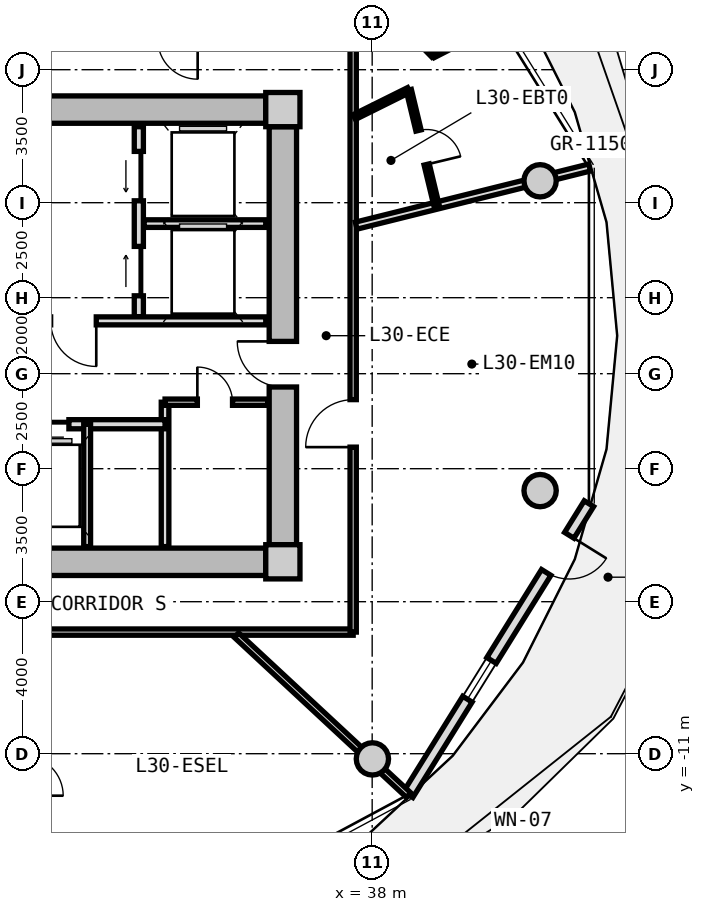
"""IFC4 building model, lengths in metres.
Left out: names, types, materials, properties, quantities, classifications, styles, units other than length and angle.
Written with IfcOpenShell. Run it as: python <this file> out.ifc"""

import sys

from ifc_helpers import new_model, si_unit, direction, frame, frame_2d, origin, origin_2d, place, context, subcontext, project, spatial, rectangle, circle, extrude, source, transform, mapped, element, fill, save


model = new_model("IFC4")
c1 = context("Model", 3, precision=1e-05, world=origin(), true_north=direction((0.0, 1.0)))
c2 = subcontext(c1, "Body", "Model", "MODEL_VIEW")
j1 = project(units=[si_unit("LENGTHUNIT", "METRE"), si_unit("PLANEANGLEUNIT", "RADIAN")], contexts=[c1])
p1 = place(None, origin())
s1 = spatial("IfcSite", under=j1, at=p1, CompositionType="ELEMENT")
p2 = place(p1, origin())
s2 = spatial("IfcBuilding", under=s1, at=p2, CompositionType="ELEMENT")
p3 = place(p2, frame((0.0, 0.0, 99.3)))
s3 = spatial("IfcBuildingStorey", under=s2, at=p3, CompositionType="ELEMENT", Elevation=99.3)
m1 = source(origin(), c2, "Body", "SweptSolid", [
    extrude(rectangle(XDim=0.9, YDim=0.9, at=origin_2d()), origin(), (0.0, 0.0, 1.0), 3.05),
])
for number, where, z_axis, x_axis in (
    (1, (35.65, -5.95, 0.0), (0.0, 0.0, 1.0), (1.0, 0.0, 0.0)),
    (2, (35.65, 5.95, 0.0), (0.0, 0.0, 1.0), (1.0, 0.0, 0.0)),
):
    element("IfcColumn", number, at=place(p3, frame(where, z_axis=z_axis, x_axis=x_axis)), inside=s3, PredefinedType="COLUMN", context=c2, shape_type="MappedRepresentation", body=[
        mapped(m1, transform((0.0, 0.0, 0.0), x_axis=(1.0, 0.0, 0.0), y_axis=(0.0, 1.0, 0.0), z_axis=(0.0, 0.0, 1.0), scale=1.0)),
    ])
m2 = source(origin(), c2, "Body", "SweptSolid", [
    extrude(rectangle(XDim=14.4, YDim=0.72, at=frame_2d((7.2, 0.0))), origin(), (0.0, 0.0, 1.0), 2.79),
])
for number, where, z_axis, x_axis in (
    (3, (20.8, 5.95, 0.0), (0.0, 0.0, 1.0), (1.0, 0.0, 0.0)),
    (4, (35.2, -5.95, 0.0), (0.0, 0.0, 1.0), (-1.0, 0.0, 0.0)),
):
    element("IfcWall", number, at=place(p3, frame(where, z_axis=z_axis, x_axis=x_axis)), inside=s3, PredefinedType="SHEAR", context=c2, shape_type="MappedRepresentation", body=[
        mapped(m2, transform((0.0, 0.0, 0.0), x_axis=(1.0, 0.0, 0.0), y_axis=(0.0, 1.0, 0.0), z_axis=(0.0, 0.0, 1.0), scale=1.0)),
    ])
m3 = source(origin(), c2, "Body", "SweptSolid", [
    extrude(rectangle(XDim=11.0, YDim=0.72, at=frame_2d((5.5, 0.0))), origin(), (0.0, 0.0, 1.0), 2.79),
])
p4 = place(p3, frame((35.65, 5.5, 0.0), z_axis=(0.0, 0.0, 1.0), x_axis=(0.0, -1.0, 0.0)))
e5 = element("IfcWall", 5, at=p4, inside=s3, PredefinedType="SHEAR", context=c2, shape_type="MappedRepresentation", body=[
    mapped(m3, transform((0.0, 0.0, 0.0), x_axis=(1.0, 0.0, 0.0), y_axis=(0.0, 1.0, 0.0), z_axis=(0.0, 0.0, 1.0), scale=1.0)),
])
p5 = place(p4, frame((5.65, 0.0, 0.0)))
e6 = element("IfcOpeningElement", 6, at=p5, cuts=e5, PredefinedType="OPENING", context=c2, shape_type="SweptSolid", body=[
    extrude(rectangle(XDim=1.2, YDim=2.15, at=frame_2d((0.6, 1.075))), frame((0.0, 0.37, 0.0), z_axis=(0.0, -1.0, 0.0), x_axis=(1.0, 0.0, 0.0)), (0.0, 0.0, 1.0), 0.74),
])
m4 = source(origin(), c2, "Body", "SweptSolid", [
    extrude(circle(Radius=0.425, at=origin_2d()), origin(), (0.0, 0.0, 1.0), 3.05),
])
for number, where, z_axis, x_axis in (
    (7, (42.419, 4.076, 0.0), (0.0, 0.0, 1.0), (1.0, 0.0, 0.0)),
    (8, (38.006, -11.137, 0.0), (0.0, 0.0, 1.0), (1.0, 0.0, 0.0)),
    (9, (42.419, -4.076, 0.0), (0.0, 0.0, 1.0), (1.0, 0.0, 0.0)),
):
    element("IfcColumn", number, at=place(p3, frame(where, z_axis=z_axis, x_axis=x_axis)), inside=s3, PredefinedType="COLUMN", context=c2, shape_type="MappedRepresentation", body=[
        mapped(m4, transform((0.0, 0.0, 0.0), x_axis=(1.0, 0.0, 0.0), y_axis=(0.0, 1.0, 0.0), z_axis=(0.0, 0.0, 1.0), scale=1.0)),
    ])
m5 = source(origin(), c2, "Body", "SweptSolid", [
    extrude(rectangle(XDim=9.014, YDim=0.29, at=frame_2d((4.507, 0.0))), origin(), (0.0, 0.0, 1.0), 2.79),
])
p6 = place(p3, frame((43.704, -4.421, 0.0), z_axis=(0.0, 0.0, 1.0), x_axis=(-0.527732945084, -0.849410347637, 0.0)))
e10 = element("IfcWall", 10, at=p6, inside=s3, PredefinedType="SOLIDWALL", context=c2, shape_type="MappedRepresentation", body=[
    mapped(m5, transform((0.0, 0.0, 0.0), x_axis=(1.0, 0.0, 0.0), y_axis=(0.0, 1.0, 0.0), z_axis=(0.0, 0.0, 1.0), scale=1.0)),
])
p7 = place(p6, frame((0.98, 0.0, 0.0)))
e11 = element("IfcOpeningElement", 11, at=p7, cuts=e10, PredefinedType="OPENING", context=c2, shape_type="SweptSolid", body=[
    extrude(rectangle(XDim=1.15, YDim=2.25, at=frame_2d((0.575, 1.125))), frame((0.0, 0.155, 0.0), z_axis=(0.0, -1.0, 0.0), x_axis=(1.0, 0.0, 0.0)), (0.0, 0.0, 1.0), 0.31),
])
p8 = place(p6, frame((4.857, 0.0, 0.85)))
e12 = element("IfcOpeningElement", 12, at=p8, cuts=e10, PredefinedType="OPENING", context=c2, shape_type="SweptSolid", body=[
    extrude(rectangle(XDim=1.2, YDim=1.5, at=frame_2d((0.6, 0.75))), frame((0.0, 0.155, 0.0), z_axis=(0.0, -1.0, 0.0), x_axis=(1.0, 0.0, 0.0)), (0.0, 0.0, 1.0), 0.31),
])
m6 = source(origin(), c2, "Body", "SweptSolid", [
    extrude(rectangle(XDim=5.0, YDim=0.24, at=frame_2d((2.5, 0.0))), origin(), (0.0, 0.0, 1.0), 2.775),
])
p9 = place(p3, frame((31.86, 0.5, 0.0), z_axis=(0.0, 0.0, 1.0), x_axis=(0.0, 1.0, 0.0)))
e13 = element("IfcWall", 13, at=p9, inside=s3, PredefinedType="PARTITIONING", context=c2, shape_type="MappedRepresentation", body=[
    mapped(m6, transform((0.0, 0.0, 0.0), x_axis=(1.0, 0.0, 0.0), y_axis=(0.0, 1.0, 0.0), z_axis=(0.0, 0.0, 1.0), scale=1.0)),
])
p10 = place(p9, frame((3.05, 0.0, 0.0)))
e14 = element("IfcOpeningElement", 14, at=p10, cuts=e13, PredefinedType="OPENING", context=c2, shape_type="SweptSolid", body=[
    extrude(rectangle(XDim=1.3, YDim=2.2, at=frame_2d((0.65, 1.1))), frame((0.0, 0.13, 0.0), z_axis=(0.0, -1.0, 0.0), x_axis=(1.0, 0.0, 0.0)), (0.0, 0.0, 1.0), 0.26),
])
p11 = place(p9, frame((0.55, 0.0, 0.0)))
e15 = element("IfcOpeningElement", 15, at=p11, cuts=e13, PredefinedType="OPENING", context=c2, shape_type="SweptSolid", body=[
    extrude(rectangle(XDim=1.3, YDim=2.2, at=frame_2d((0.65, 1.1))), frame((0.0, 0.13, 0.0), z_axis=(0.0, -1.0, 0.0), x_axis=(1.0, 0.0, 0.0)), (0.0, 0.0, 1.0), 0.26),
])
m7 = source(origin(), c2, "Body", "SweptSolid", [
    extrude(rectangle(XDim=3.2, YDim=0.2, at=frame_2d((1.6, 0.0))), origin(), (0.0, 0.0, 1.0), 2.775),
])
p12 = place(p3, frame((32.0, 2.95, 0.0), z_axis=(0.0, 0.0, 1.0), x_axis=(1.0, 0.0, 0.0)))
e16 = element("IfcWall", 16, at=p12, inside=s3, PredefinedType="PARTITIONING", context=c2, shape_type="MappedRepresentation", body=[
    mapped(m7, transform((0.0, 0.0, 0.0), x_axis=(1.0, 0.0, 0.0), y_axis=(0.0, 1.0, 0.0), z_axis=(0.0, 0.0, 1.0), scale=1.0)),
])
m8 = source(origin(), c2, "Body", "SweptSolid", [
    extrude(rectangle(XDim=6.66, YDim=0.21, at=frame_2d((3.33, 0.0))), origin(), (0.0, 0.0, 1.0), 2.775),
])
p13 = place(p3, frame((28.54, 0.39, 0.0), z_axis=(0.0, 0.0, 1.0), x_axis=(1.0, 0.0, 0.0)))
e17 = element("IfcWall", 17, at=p13, inside=s3, PredefinedType="PARTITIONING", context=c2, shape_type="MappedRepresentation", body=[
    mapped(m8, transform((0.0, 0.0, 0.0), x_axis=(1.0, 0.0, 0.0), y_axis=(0.0, 1.0, 0.0), z_axis=(0.0, 0.0, 1.0), scale=1.0)),
])
p14 = place(p13, frame((1.0, 0.0, 0.0)))
e18 = element("IfcOpeningElement", 18, at=p14, cuts=e17, PredefinedType="OPENING", context=c2, shape_type="SweptSolid", body=[
    extrude(rectangle(XDim=1.2, YDim=2.15, at=frame_2d((0.6, 1.075))), frame((0.0, 0.115, 0.0), z_axis=(0.0, -1.0, 0.0), x_axis=(1.0, 0.0, 0.0)), (0.0, 0.0, 1.0), 0.23),
])
m9 = source(origin(), c2, "Body", "SweptSolid", [
    extrude(rectangle(XDim=3.8, YDim=0.2, at=frame_2d((1.9, 0.0))), origin(), (0.0, 0.0, 1.0), 2.775),
])
p15 = place(p3, frame((32.55, -5.55, 0.0), z_axis=(0.0, 0.0, 1.0), x_axis=(0.0, 1.0, 0.0)))
e19 = element("IfcWall", 19, at=p15, inside=s3, PredefinedType="PARTITIONING", context=c2, shape_type="MappedRepresentation", body=[
    mapped(m9, transform((0.0, 0.0, 0.0), x_axis=(1.0, 0.0, 0.0), y_axis=(0.0, 1.0, 0.0), z_axis=(0.0, 0.0, 1.0), scale=1.0)),
])
m10 = source(origin(), c2, "Body", "SweptSolid", [
    extrude(rectangle(XDim=4.13, YDim=0.24, at=frame_2d((2.065, 0.0))), origin(), (0.0, 0.0, 1.0), 2.775),
])
p16 = place(p3, frame((28.42, -2.33, 0.0), z_axis=(0.0, 0.0, 1.0), x_axis=(1.0, 0.0, 0.0)))
e20 = element("IfcWall", 20, at=p16, inside=s3, PredefinedType="PARTITIONING", context=c2, shape_type="MappedRepresentation", body=[
    mapped(m10, transform((0.0, 0.0, 0.0), x_axis=(1.0, 0.0, 0.0), y_axis=(0.0, 1.0, 0.0), z_axis=(0.0, 0.0, 1.0), scale=1.0)),
])
p17 = place(p16, frame((0.5, 0.0, 0.0)))
e21 = element("IfcOpeningElement", 21, at=p17, cuts=e20, PredefinedType="OPENING", context=c2, shape_type="SweptSolid", body=[
    extrude(rectangle(XDim=1.1, YDim=2.2, at=frame_2d((0.55, 1.1))), frame((0.0, 0.13, 0.0), z_axis=(0.0, -1.0, 0.0), x_axis=(1.0, 0.0, 0.0)), (0.0, 0.0, 1.0), 0.26),
])
m11 = source(origin(), c2, "Body", "SweptSolid", [
    extrude(rectangle(XDim=3.22, YDim=0.18, at=frame_2d((1.61, 0.0))), origin(), (0.0, 0.0, 1.0), 2.775),
])
p18 = place(p3, frame((30.5, -5.55, 0.0), z_axis=(0.0, 0.0, 1.0), x_axis=(0.0, 1.0, 0.0)))
e22 = element("IfcWall", 22, at=p18, inside=s3, PredefinedType="PARTITIONING", context=c2, shape_type="MappedRepresentation", body=[
    mapped(m11, transform((0.0, 0.0, 0.0), x_axis=(1.0, 0.0, 0.0), y_axis=(0.0, 1.0, 0.0), z_axis=(0.0, 0.0, 1.0), scale=1.0)),
])
m12 = source(origin(), c2, "Body", "SweptSolid", [
    extrude(rectangle(XDim=2.7, YDim=0.165, at=frame_2d((1.35, 0.0))), origin(), (0.0, 0.0, 1.0), 2.775),
])
p19 = place(p3, frame((32.55, -1.75, 0.0), z_axis=(0.0, 0.0, 1.0), x_axis=(1.0, 0.0, 0.0)))
e23 = element("IfcWall", 23, at=p19, inside=s3, PredefinedType="PARTITIONING", context=c2, shape_type="MappedRepresentation", body=[
    mapped(m12, transform((0.0, 0.0, 0.0), x_axis=(1.0, 0.0, 0.0), y_axis=(0.0, 1.0, 0.0), z_axis=(0.0, 0.0, 1.0), scale=1.0)),
])
p20 = place(p19, frame((0.85, 0.0, 0.0)))
e24 = element("IfcOpeningElement", 24, at=p20, cuts=e23, PredefinedType="OPENING", context=c2, shape_type="SweptSolid", body=[
    extrude(rectangle(XDim=0.925, YDim=2.1, at=frame_2d((0.462, 1.05))), frame((0.0, 0.093, 0.0), z_axis=(0.0, -1.0, 0.0), x_axis=(1.0, 0.0, 0.0)), (0.0, 0.0, 1.0), 0.185),
])
m13 = source(origin(), c2, "Body", "SweptSolid", [
    extrude(rectangle(XDim=8.6, YDim=0.165, at=frame_2d((4.3, 0.0))), origin(), (0.0, 0.0, 1.0), 2.775),
])
p21 = place(p3, frame((37.5, -7.8, 0.0), z_axis=(0.0, 0.0, 1.0), x_axis=(-1.0, 0.0, 0.0)))
e25 = element("IfcWall", 25, at=p21, inside=s3, PredefinedType="PARTITIONING", context=c2, shape_type="MappedRepresentation", body=[
    mapped(m13, transform((0.0, 0.0, 0.0), x_axis=(1.0, 0.0, 0.0), y_axis=(0.0, 1.0, 0.0), z_axis=(0.0, 0.0, 1.0), scale=1.0)),
])
m14 = source(origin(), c2, "Body", "SweptSolid", [
    extrude(rectangle(XDim=15.6, YDim=0.165, at=frame_2d((7.8, 0.0))), origin(), (0.0, 0.0, 1.0), 2.775),
])
p22 = place(p3, frame((37.5, 7.8, 0.0), z_axis=(0.0, 0.0, 1.0), x_axis=(0.0, -1.0, 0.0)))
e26 = element("IfcWall", 26, at=p22, inside=s3, PredefinedType="PARTITIONING", context=c2, shape_type="MappedRepresentation", body=[
    mapped(m14, transform((0.0, 0.0, 0.0), x_axis=(1.0, 0.0, 0.0), y_axis=(0.0, 1.0, 0.0), z_axis=(0.0, 0.0, 1.0), scale=1.0)),
])
p23 = place(p22, frame((9.482, 0.0, 0.0)))
e27 = element("IfcOpeningElement", 27, at=p23, cuts=e26, PredefinedType="OPENING", context=c2, shape_type="SweptSolid", body=[
    extrude(rectangle(XDim=1.25, YDim=2.2, at=frame_2d((0.625, 1.1))), frame((0.0, 0.093, 0.0), z_axis=(0.0, -1.0, 0.0), x_axis=(1.0, 0.0, 0.0)), (0.0, 0.0, 1.0), 0.185),
])
m15 = source(origin(), c2, "Body", "SweptSolid", [
    extrude(rectangle(XDim=6.187, YDim=0.165, at=frame_2d((3.093, 0.0))), origin(), (0.0, 0.0, 1.0), 2.275),
])
p24 = place(p3, frame((34.429, -7.88, 0.0), z_axis=(0.0, 0.0, 1.0), x_axis=(0.732501077882, -0.680765870841, 0.0)))
e28 = element("IfcWall", 28, at=p24, inside=s3, PredefinedType="PARTITIONING", context=c2, shape_type="MappedRepresentation", body=[
    mapped(m15, transform((0.0, 0.0, 0.0), x_axis=(1.0, 0.0, 0.0), y_axis=(0.0, 1.0, 0.0), z_axis=(0.0, 0.0, 1.0), scale=1.0)),
])
m16 = source(origin(), c2, "Body", "SweptSolid", [
    extrude(rectangle(XDim=6.331, YDim=0.19, at=frame_2d((3.165, 0.0))), origin(), (0.0, 0.0, 1.0), 2.275),
])
p25 = place(p3, frame((37.58, 2.896, 0.0), z_axis=(0.0, 0.0, 1.0), x_axis=(0.97036440661, 0.241646267062, 0.0)))
e29 = element("IfcWall", 29, at=p25, inside=s3, PredefinedType="PARTITIONING", context=c2, shape_type="MappedRepresentation", body=[
    mapped(m16, transform((0.0, 0.0, 0.0), x_axis=(1.0, 0.0, 0.0), y_axis=(0.0, 1.0, 0.0), z_axis=(0.0, 0.0, 1.0), scale=1.0)),
])
m17 = source(origin(), c2, "Body", "SweptSolid", [
    extrude(rectangle(XDim=1.6, YDim=0.14, at=frame_2d((0.8, 0.0))), origin(), (0.0, 0.0, 1.0), 2.775),
])
p26 = place(p3, frame((37.53, 5.754, 0.0), z_axis=(0.0, 0.0, 1.0), x_axis=(0.895522919837, 0.445015393044, 0.0)))
e30 = element("IfcWall", 30, at=p26, inside=s3, PredefinedType="PARTITIONING", context=c2, shape_type="MappedRepresentation", body=[
    mapped(m17, transform((0.0, 0.0, 0.0), x_axis=(1.0, 0.0, 0.0), y_axis=(0.0, 1.0, 0.0), z_axis=(0.0, 0.0, 1.0), scale=1.0)),
])
m18 = source(origin(), c2, "Body", "SweptSolid", [
    extrude(rectangle(XDim=3.112, YDim=0.14, at=frame_2d((1.556, 0.0))), origin(), (0.0, 0.0, 1.0), 2.415),
])
p27 = place(p3, frame((38.963, 6.466, 0.0), z_axis=(0.0, 0.0, 1.0), x_axis=(0.233737944029, -0.972299631555, 0.0)))
e31 = element("IfcWall", 31, at=p27, inside=s3, PredefinedType="PARTITIONING", context=c2, shape_type="MappedRepresentation", body=[
    mapped(m18, transform((0.0, 0.0, 0.0), x_axis=(1.0, 0.0, 0.0), y_axis=(0.0, 1.0, 0.0), z_axis=(0.0, 0.0, 1.0), scale=1.0)),
])
p28 = place(p27, frame((1.096, 0.0, 0.0)))
e32 = element("IfcOpeningElement", 32, at=p28, cuts=e31, PredefinedType="OPENING", context=c2, shape_type="SweptSolid", body=[
    extrude(rectangle(XDim=0.92, YDim=2.1, at=frame_2d((0.46, 1.05))), frame((0.0, 0.08, 0.0), z_axis=(0.0, -1.0, 0.0), x_axis=(1.0, 0.0, 0.0)), (0.0, 0.0, 1.0), 0.16),
])
m19 = source(origin(), c2, "Body", "SweptSolid", [
    extrude(rectangle(XDim=1.945, YDim=0.115, at=frame_2d((0.973, 0.0))), origin(), (0.0, 0.0, 1.0), 2.775),
])
p29 = place(p3, frame((39.611, 7.37, 0.0), z_axis=(0.0, 0.0, 1.0), x_axis=(0.889684148329, 0.456576517368, 0.0)))
e33 = element("IfcWall", 33, at=p29, inside=s3, PredefinedType="PARTITIONING", context=c2, shape_type="MappedRepresentation", body=[
    mapped(m19, transform((0.0, 0.0, 0.0), x_axis=(1.0, 0.0, 0.0), y_axis=(0.0, 1.0, 0.0), z_axis=(0.0, 0.0, 1.0), scale=1.0)),
])
m20 = source(origin(), c2, "Body", "SweptSolid", [
    extrude(rectangle(XDim=3.943, YDim=0.115, at=frame_2d((1.972, 0.0))), origin(), (0.0, 0.0, 1.0), 2.775),
])
p30 = place(p3, frame((39.611, 7.37, 0.0), z_axis=(0.0, 0.0, 1.0), x_axis=(-0.699481885754, 0.714650328134, 0.0)))
e34 = element("IfcWall", 34, at=p30, inside=s3, PredefinedType="PARTITIONING", context=c2, shape_type="MappedRepresentation", body=[
    mapped(m20, transform((0.0, 0.0, 0.0), x_axis=(1.0, 0.0, 0.0), y_axis=(0.0, 1.0, 0.0), z_axis=(0.0, 0.0, 1.0), scale=1.0)),
])
p31 = place(p30, frame((1.497, 0.0, 0.0)))
e35 = element("IfcOpeningElement", 35, at=p31, cuts=e34, PredefinedType="OPENING", context=c2, shape_type="SweptSolid", body=[
    extrude(rectangle(XDim=0.95, YDim=2.1, at=frame_2d((0.475, 1.05))), frame((0.0, 0.067, 0.0), z_axis=(0.0, -1.0, 0.0), x_axis=(1.0, 0.0, 0.0)), (0.0, 0.0, 1.0), 0.135),
])
m21 = source(origin(), c2, "Body", "SweptSolid", [
    extrude(rectangle(XDim=1.15, YDim=2.25, at=frame_2d((0.575, 1.125))), frame((0.0, 0.025, 0.0), z_axis=(0.0, -1.0, 0.0), x_axis=(1.0, 0.0, 0.0)), (0.0, 0.0, 1.0), 0.05),
])
p32 = place(p7, origin())
e36 = element("IfcDoor", 36, at=p32, inside=s3, OperationType="SINGLE_SWING_LEFT", PredefinedType="DOOR", context=c2, shape_type="MappedRepresentation", body=[
    mapped(m21, transform((0.0, 0.0, 0.0), x_axis=(1.0, 0.0, 0.0), y_axis=(0.0, 1.0, 0.0), z_axis=(0.0, 0.0, 1.0), scale=1.0)),
])
fill(e11, e36)
m22 = source(origin(), c2, "Body", "SweptSolid", [
    extrude(rectangle(XDim=1.2, YDim=1.5, at=frame_2d((0.6, 0.75))), frame((0.0, 0.03, 0.0), z_axis=(0.0, -1.0, 0.0), x_axis=(1.0, 0.0, 0.0)), (0.0, 0.0, 1.0), 0.06),
])
p33 = place(p8, origin())
e37 = element("IfcWindow", 37, at=p33, inside=s3, PartitioningType="SINGLE_PANEL", PredefinedType="WINDOW", context=c2, shape_type="MappedRepresentation", body=[
    mapped(m22, transform((0.0, 0.0, 0.0), x_axis=(1.0, 0.0, 0.0), y_axis=(0.0, 1.0, 0.0), z_axis=(0.0, 0.0, 1.0), scale=1.0)),
])
fill(e12, e37)
m23 = source(origin(), c2, "Body", "SweptSolid", [
    extrude(rectangle(XDim=1.3, YDim=2.2, at=frame_2d((0.65, 1.1))), frame((0.0, 0.025, 0.0), z_axis=(0.0, -1.0, 0.0), x_axis=(1.0, 0.0, 0.0)), (0.0, 0.0, 1.0), 0.05),
])
p34 = place(p10, origin())
e38 = element("IfcDoor", 38, at=p34, inside=s3, OperationType="SLIDING_TO_LEFT", PredefinedType="DOOR", context=c2, shape_type="MappedRepresentation", body=[
    mapped(m23, transform((0.0, 0.0, 0.0), x_axis=(1.0, 0.0, 0.0), y_axis=(0.0, 1.0, 0.0), z_axis=(0.0, 0.0, 1.0), scale=1.0)),
])
fill(e14, e38)
p35 = place(p11, origin())
e39 = element("IfcDoor", 39, at=p35, inside=s3, OperationType="SLIDING_TO_RIGHT", PredefinedType="DOOR", context=c2, shape_type="MappedRepresentation", body=[
    mapped(m23, transform((0.0, 0.0, 0.0), x_axis=(1.0, 0.0, 0.0), y_axis=(0.0, 1.0, 0.0), z_axis=(0.0, 0.0, 1.0), scale=1.0)),
])
fill(e15, e39)
m24 = source(origin(), c2, "Body", "SweptSolid", [
    extrude(rectangle(XDim=1.2, YDim=2.15, at=frame_2d((0.6, 1.075))), frame((0.0, 0.025, 0.0), z_axis=(0.0, -1.0, 0.0), x_axis=(1.0, 0.0, 0.0)), (0.0, 0.0, 1.0), 0.05),
])
p36 = place(p14, frame((1.2, 0.0, 0.0), z_axis=(0.0, 0.0, 1.0), x_axis=(-1.0, 0.0, 0.0)))
e40 = element("IfcDoor", 40, at=p36, inside=s3, OperationType="SINGLE_SWING_LEFT", PredefinedType="DOOR", context=c2, shape_type="MappedRepresentation", body=[
    mapped(m24, transform((0.0, 0.0, 0.0), x_axis=(1.0, 0.0, 0.0), y_axis=(0.0, 1.0, 0.0), z_axis=(0.0, 0.0, 1.0), scale=1.0)),
])
fill(e18, e40)
p37 = place(p5, frame((1.2, 0.0, 0.0), z_axis=(0.0, 0.0, 1.0), x_axis=(-1.0, 0.0, 0.0)))
e41 = element("IfcDoor", 41, at=p37, inside=s3, OperationType="SINGLE_SWING_RIGHT", PredefinedType="DOOR", context=c2, shape_type="MappedRepresentation", body=[
    mapped(m24, transform((0.0, 0.0, 0.0), x_axis=(1.0, 0.0, 0.0), y_axis=(0.0, 1.0, 0.0), z_axis=(0.0, 0.0, 1.0), scale=1.0)),
])
fill(e6, e41)
m25 = source(origin(), c2, "Body", "SweptSolid", [
    extrude(rectangle(XDim=1.1, YDim=2.2, at=frame_2d((0.55, 1.1))), frame((0.0, 0.025, 0.0), z_axis=(0.0, -1.0, 0.0), x_axis=(1.0, 0.0, 0.0)), (0.0, 0.0, 1.0), 0.05),
])
p38 = place(p17, frame((1.1, 0.0, 0.0), z_axis=(0.0, 0.0, 1.0), x_axis=(-1.0, 0.0, 0.0)))
e42 = element("IfcDoor", 42, at=p38, inside=s3, OperationType="SLIDING_TO_LEFT", PredefinedType="DOOR", context=c2, shape_type="MappedRepresentation", body=[
    mapped(m25, transform((0.0, 0.0, 0.0), x_axis=(1.0, 0.0, 0.0), y_axis=(0.0, 1.0, 0.0), z_axis=(0.0, 0.0, 1.0), scale=1.0)),
])
fill(e21, e42)
m26 = source(origin(), c2, "Body", "SweptSolid", [
    extrude(rectangle(XDim=0.925, YDim=2.1, at=frame_2d((0.462, 1.05))), frame((0.0, 0.025, 0.0), z_axis=(0.0, -1.0, 0.0), x_axis=(1.0, 0.0, 0.0)), (0.0, 0.0, 1.0), 0.05),
])
p39 = place(p20, origin())
e43 = element("IfcDoor", 43, at=p39, inside=s3, OperationType="SINGLE_SWING_LEFT", PredefinedType="DOOR", context=c2, shape_type="MappedRepresentation", body=[
    mapped(m26, transform((0.0, 0.0, 0.0), x_axis=(1.0, 0.0, 0.0), y_axis=(0.0, 1.0, 0.0), z_axis=(0.0, 0.0, 1.0), scale=1.0)),
])
fill(e24, e43)
m27 = source(origin(), c2, "Body", "SweptSolid", [
    extrude(rectangle(XDim=1.25, YDim=2.2, at=frame_2d((0.625, 1.1))), frame((0.0, 0.025, 0.0), z_axis=(0.0, -1.0, 0.0), x_axis=(1.0, 0.0, 0.0)), (0.0, 0.0, 1.0), 0.05),
])
p40 = place(p23, frame((1.25, 0.0, 0.0), z_axis=(0.0, 0.0, 1.0), x_axis=(-1.0, 0.0, 0.0)))
e44 = element("IfcDoor", 44, at=p40, inside=s3, OperationType="SINGLE_SWING_LEFT", PredefinedType="DOOR", context=c2, shape_type="MappedRepresentation", body=[
    mapped(m27, transform((0.0, 0.0, 0.0), x_axis=(1.0, 0.0, 0.0), y_axis=(0.0, 1.0, 0.0), z_axis=(0.0, 0.0, 1.0), scale=1.0)),
])
fill(e27, e44)
m28 = source(origin(), c2, "Body", "SweptSolid", [
    extrude(rectangle(XDim=0.92, YDim=2.1, at=frame_2d((0.46, 1.05))), frame((0.0, 0.025, 0.0), z_axis=(0.0, -1.0, 0.0), x_axis=(1.0, 0.0, 0.0)), (0.0, 0.0, 1.0), 0.05),
])
p41 = place(p28, origin())
e45 = element("IfcDoor", 45, at=p41, inside=s3, OperationType="SINGLE_SWING_RIGHT", PredefinedType="DOOR", context=c2, shape_type="MappedRepresentation", body=[
    mapped(m28, transform((0.0, 0.0, 0.0), x_axis=(1.0, 0.0, 0.0), y_axis=(0.0, 1.0, 0.0), z_axis=(0.0, 0.0, 1.0), scale=1.0)),
])
fill(e32, e45)
save(model, sys.argv[1])
